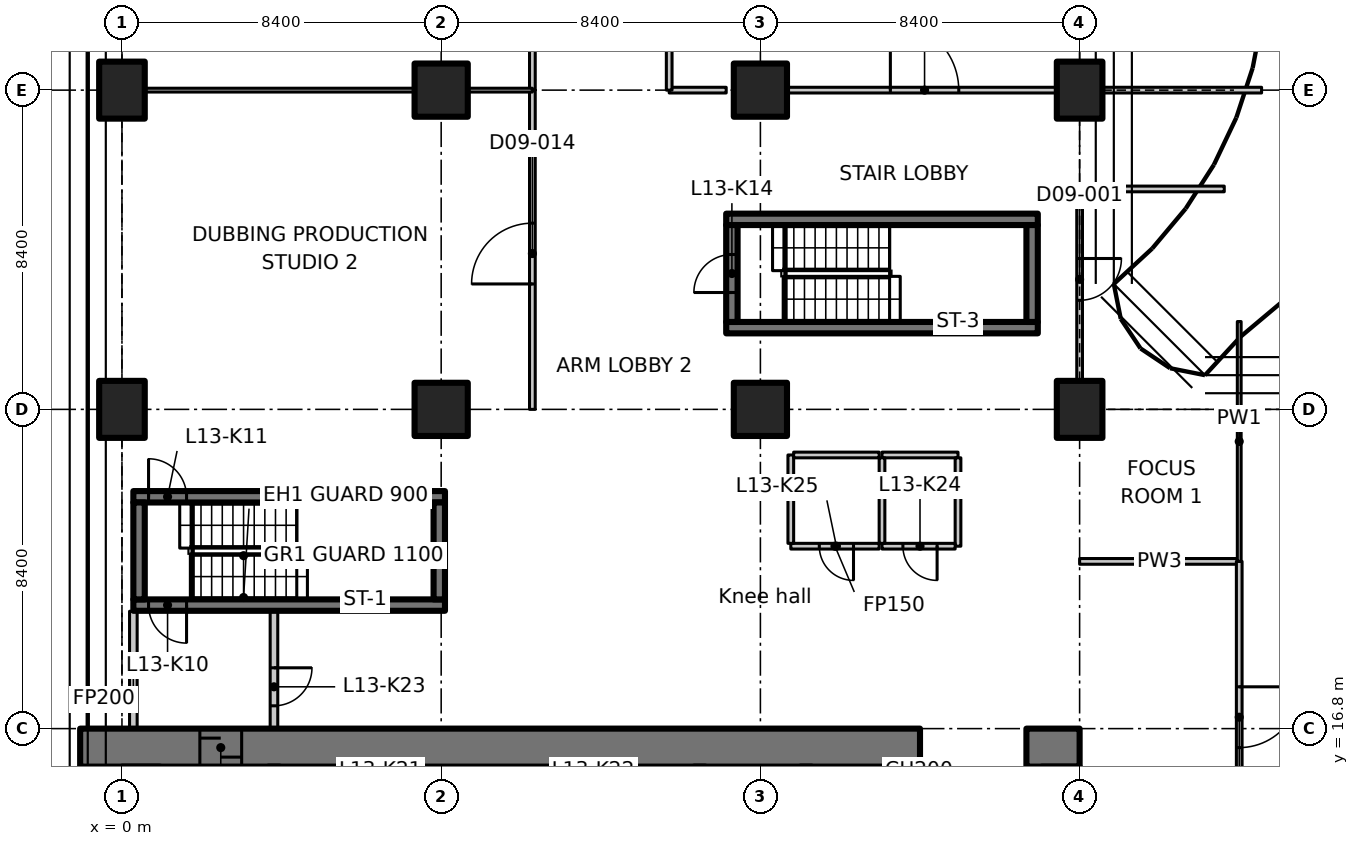
"""IFC4 building model, lengths in metres.
Left out: names, types, materials, properties, quantities, classifications, styles, units other than length and angle.
Written with IfcOpenShell. Run it as: python <this file> out.ifc"""

import sys

from ifc_helpers import new_model, si_unit, direction, frame, frame_2d, origin, origin_2d, place, context, subcontext, project, spatial, polyline, rectangle, outline, extrude, element, fill, save


model = new_model("IFC4")
c1 = context("Model", 3, precision=1e-05, world=origin(), true_north=direction((0.0, 1.0)))
c2 = subcontext(c1, "Body", "Model", "MODEL_VIEW")
j1 = project(units=[si_unit("LENGTHUNIT", "METRE"), si_unit("PLANEANGLEUNIT", "RADIAN")], contexts=[c1])
p1 = place(None, origin())
s1 = spatial("IfcSite", under=j1, at=p1, CompositionType="ELEMENT")
p2 = place(p1, origin())
s2 = spatial("IfcBuilding", under=s1, at=p2, CompositionType="ELEMENT")
p3 = place(p2, frame((0.0, 0.0, 61.7)))
s3 = spatial("IfcBuildingStorey", under=s2, at=p3, CompositionType="ELEMENT", Elevation=61.7)
for number, where, z_axis, x_axis in (
    (1, (0.0, 25.2, 0.0), (0.0, 0.0, 1.0), (1.0, 0.0, 0.0)),
    (2, (0.0, 33.6, 0.0), (0.0, 0.0, 1.0), (1.0, 0.0, 0.0)),
):
    element("IfcColumn", number, at=place(p3, frame(where, z_axis=z_axis, x_axis=x_axis)), inside=s3, PredefinedType="COLUMN", context=c2, shape_type="SweptSolid", body=[
        extrude(rectangle(XDim=1.2, YDim=1.5, at=origin_2d()), origin(), (0.0, 0.0, 1.0), 3.35),
    ])
for number, where, z_axis, x_axis in (
    (3, (8.4, 25.2, 0.0), (0.0, 0.0, 1.0), (1.0, 0.0, 0.0)),
    (4, (8.4, 33.6, 0.0), (0.0, 0.0, 1.0), (1.0, 0.0, 0.0)),
    (5, (16.8, 25.2, 0.0), (0.0, 0.0, 1.0), (1.0, 0.0, 0.0)),
    (6, (16.8, 33.6, 0.0), (0.0, 0.0, 1.0), (1.0, 0.0, 0.0)),
):
    element("IfcColumn", number, at=place(p3, frame(where, z_axis=z_axis, x_axis=x_axis)), inside=s3, PredefinedType="COLUMN", context=c2, shape_type="SweptSolid", body=[
        extrude(rectangle(XDim=1.4, YDim=1.4, at=origin_2d()), origin(), (0.0, 0.0, 1.0), 3.35),
    ])
for number, where, z_axis, x_axis in (
    (7, (25.2, 25.2, 0.0), (0.0, 0.0, 1.0), (1.0, 0.0, 0.0)),
    (8, (25.2, 33.6, 0.0), (0.0, 0.0, 1.0), (1.0, 0.0, 0.0)),
):
    element("IfcColumn", number, at=place(p3, frame(where, z_axis=z_axis, x_axis=x_axis)), inside=s3, PredefinedType="COLUMN", context=c2, shape_type="SweptSolid", body=[
        extrude(rectangle(XDim=1.2, YDim=1.5, at=origin_2d()), origin(), (0.0, 0.0, 1.0), 3.35),
    ])
p4 = place(p3, frame((-1.1, 16.3, 0.0), z_axis=(0.0, 0.0, 1.0), x_axis=(1.0, 0.0, 0.0)))
e9 = element("IfcWall", 9, at=p4, inside=s3, PredefinedType="SHEAR", context=c2, shape_type="SweptSolid", body=[
    extrude(rectangle(XDim=22.1, YDim=1.0, at=frame_2d((11.05, 0.0))), origin(), (0.0, 0.0, 1.0), 3.35),
])
p5 = place(p4, frame((3.15, 0.0, 0.0)))
e10 = element("IfcOpeningElement", 10, at=p5, cuts=e9, PredefinedType="OPENING", context=c2, shape_type="SweptSolid", body=[
    extrude(rectangle(XDim=1.1, YDim=2.3, at=frame_2d((0.55, 1.15))), frame((0.0, 0.51, 0.0), z_axis=(0.0, -1.0, 0.0), x_axis=(1.0, 0.0, 0.0)), (0.0, 0.0, 1.0), 1.02),
])
p6 = place(p3, frame((23.8, 16.3, 0.0), z_axis=(0.0, 0.0, 1.0), x_axis=(1.0, 0.0, 0.0)))
e11 = element("IfcWall", 11, at=p6, inside=s3, PredefinedType="SHEAR", context=c2, shape_type="SweptSolid", body=[
    extrude(rectangle(XDim=1.4, YDim=1.0, at=frame_2d((0.7, 0.0))), origin(), (0.0, 0.0, 1.0), 3.35),
])
p7 = place(p3, frame((24.7, 12.6, 0.0), z_axis=(0.0, 0.0, 1.0), x_axis=(0.0, 1.0, 0.0)))
e12 = element("IfcWall", 12, at=p7, inside=s3, PredefinedType="SHEAR", context=c2, shape_type="SweptSolid", body=[
    extrude(rectangle(XDim=3.2, YDim=1.0, at=frame_2d((1.6, 0.0))), origin(), (0.0, 0.0, 1.0), 3.35),
])
p8 = place(p3, frame((8.5, 20.05, 0.0), z_axis=(0.0, 0.0, 1.0), x_axis=(-1.0, 0.0, 0.0)))
e13 = element("IfcWall", 13, at=p8, inside=s3, PredefinedType="SHEAR", context=c2, shape_type="SweptSolid", body=[
    extrude(rectangle(XDim=8.2, YDim=0.3, at=frame_2d((4.1, 0.0))), origin(), (0.0, 0.0, 1.0), 3.35),
])
p9 = place(p8, frame((6.8, 0.0, 0.0)))
e14 = element("IfcOpeningElement", 14, at=p9, cuts=e13, PredefinedType="OPENING", context=c2, shape_type="SweptSolid", body=[
    extrude(rectangle(XDim=1.0, YDim=2.1, at=frame_2d((0.5, 1.05))), frame((0.0, 0.16, 0.0), z_axis=(0.0, -1.0, 0.0), x_axis=(1.0, 0.0, 0.0)), (0.0, 0.0, 1.0), 0.32),
])
p10 = place(p3, frame((0.3, 22.9, 0.0), z_axis=(0.0, 0.0, 1.0), x_axis=(1.0, 0.0, 0.0)))
e15 = element("IfcWall", 15, at=p10, inside=s3, PredefinedType="SHEAR", context=c2, shape_type="SweptSolid", body=[
    extrude(rectangle(XDim=8.2, YDim=0.3, at=frame_2d((4.1, 0.0))), origin(), (0.0, 0.0, 1.0), 3.35),
])
p11 = place(p10, frame((0.4, 0.0, 0.0)))
e16 = element("IfcOpeningElement", 16, at=p11, cuts=e15, PredefinedType="OPENING", context=c2, shape_type="SweptSolid", body=[
    extrude(rectangle(XDim=1.0, YDim=2.1, at=frame_2d((0.5, 1.05))), frame((0.0, 0.16, 0.0), z_axis=(0.0, -1.0, 0.0), x_axis=(1.0, 0.0, 0.0)), (0.0, 0.0, 1.0), 0.32),
])
for number, where, z_axis, x_axis in (
    (17, (0.45, 20.2, 0.0), (0.0, 0.0, 1.0), (0.0, 1.0, 0.0)),
    (18, (8.35, 20.2, 0.0), (0.0, 0.0, 1.0), (0.0, 1.0, 0.0)),
):
    element("IfcWall", number, at=place(p3, frame(where, z_axis=z_axis, x_axis=x_axis)), inside=s3, PredefinedType="SHEAR", context=c2, shape_type="SweptSolid", body=[
        extrude(rectangle(XDim=2.55, YDim=0.3, at=frame_2d((1.275, 0.0))), origin(), (0.0, 0.0, 1.0), 3.35),
    ])
for number, where, z_axis, x_axis in (
    (19, (15.9, 27.35, 0.0), (0.0, 0.0, 1.0), (1.0, 0.0, 0.0)),
    (20, (15.9, 30.2, 0.0), (0.0, 0.0, 1.0), (1.0, 0.0, 0.0)),
):
    element("IfcWall", number, at=place(p3, frame(where, z_axis=z_axis, x_axis=x_axis)), inside=s3, PredefinedType="SHEAR", context=c2, shape_type="SweptSolid", body=[
        extrude(rectangle(XDim=8.2, YDim=0.3, at=frame_2d((4.1, 0.0))), origin(), (0.0, 0.0, 1.0), 3.35),
    ])
p12 = place(p3, frame((16.05, 27.5, 0.0), z_axis=(0.0, 0.0, 1.0), x_axis=(0.0, 1.0, 0.0)))
e21 = element("IfcWall", 21, at=p12, inside=s3, PredefinedType="SHEAR", context=c2, shape_type="SweptSolid", body=[
    extrude(rectangle(XDim=2.55, YDim=0.3, at=frame_2d((1.275, 0.0))), origin(), (0.0, 0.0, 1.0), 3.35),
])
p13 = place(p12, frame((0.775, 0.0, 0.0)))
e22 = element("IfcOpeningElement", 22, at=p13, cuts=e21, PredefinedType="OPENING", context=c2, shape_type="SweptSolid", body=[
    extrude(rectangle(XDim=1.0, YDim=2.1, at=frame_2d((0.5, 1.05))), frame((0.0, 0.16, 0.0), z_axis=(0.0, -1.0, 0.0), x_axis=(1.0, 0.0, 0.0)), (0.0, 0.0, 1.0), 0.32),
])
p14 = place(p3, frame((23.95, 27.5, 0.0), z_axis=(0.0, 0.0, 1.0), x_axis=(0.0, 1.0, 0.0)))
e23 = element("IfcWall", 23, at=p14, inside=s3, PredefinedType="SHEAR", context=c2, shape_type="SweptSolid", body=[
    extrude(rectangle(XDim=2.55, YDim=0.3, at=frame_2d((1.275, 0.0))), origin(), (0.0, 0.0, 1.0), 3.35),
])
p15 = place(p3, frame((0.3, 16.812, 0.0), z_axis=(0.0, 0.0, 1.0), x_axis=(0.0, 1.0, 0.0)))
e24 = element("IfcWall", 24, at=p15, inside=s3, PredefinedType="PARTITIONING", context=c2, shape_type="SweptSolid", body=[
    extrude(rectangle(XDim=3.076, YDim=0.2, at=frame_2d((1.538, 0.0))), origin(), (0.0, 0.0, 1.0), 2.98),
])
p16 = place(p3, frame((4.0, 19.888, 0.0), z_axis=(0.0, 0.0, 1.0), x_axis=(0.0, -1.0, 0.0)))
e25 = element("IfcWall", 25, at=p16, inside=s3, PredefinedType="PARTITIONING", context=c2, shape_type="SweptSolid", body=[
    extrude(rectangle(XDim=3.076, YDim=0.2, at=frame_2d((1.538, 0.0))), origin(), (0.0, 0.0, 1.0), 3.35),
])
p17 = place(p16, frame((1.488, 0.0, 0.0)))
e26 = element("IfcOpeningElement", 26, at=p17, cuts=e25, PredefinedType="OPENING", context=c2, shape_type="SweptSolid", body=[
    extrude(rectangle(XDim=1.0, YDim=2.1, at=frame_2d((0.5, 1.05))), frame((0.0, 0.11, 0.0), z_axis=(0.0, -1.0, 0.0), x_axis=(1.0, 0.0, 0.0)), (0.0, 0.0, 1.0), 0.22),
])
p18 = place(p3, frame((20.0, 24.0, 0.0), z_axis=(0.0, 0.0, 1.0), x_axis=(1.0, 0.0, 0.0)))
e27 = element("IfcWall", 27, at=p18, inside=s3, PredefinedType="PARTITIONING", context=c2, shape_type="SweptSolid", body=[
    extrude(rectangle(XDim=2.0, YDim=0.15, at=frame_2d((1.0, 0.0))), origin(), (0.0, 0.0, 1.0), 3.35),
])
p19 = place(p3, frame((22.0, 23.925, 0.0), z_axis=(0.0, 0.0, 1.0), x_axis=(0.0, -1.0, 0.0)))
e28 = element("IfcWall", 28, at=p19, inside=s3, PredefinedType="PARTITIONING", context=c2, shape_type="SweptSolid", body=[
    extrude(rectangle(XDim=2.325, YDim=0.15, at=frame_2d((1.163, 0.0))), origin(), (0.0, 0.0, 1.0), 3.35),
])
p20 = place(p3, frame((21.925, 21.6, 0.0), z_axis=(0.0, 0.0, 1.0), x_axis=(-1.0, 0.0, 0.0)))
e29 = element("IfcWall", 29, at=p20, inside=s3, PredefinedType="PARTITIONING", context=c2, shape_type="SweptSolid", body=[
    extrude(rectangle(XDim=1.925, YDim=0.15, at=frame_2d((0.962, 0.0))), origin(), (0.0, 0.0, 1.0), 3.35),
])
p21 = place(p20, frame((0.475, 0.0, 0.0)))
e30 = element("IfcOpeningElement", 30, at=p21, cuts=e29, PredefinedType="OPENING", context=c2, shape_type="SweptSolid", body=[
    extrude(rectangle(XDim=0.9, YDim=2.1, at=frame_2d((0.45, 1.05))), frame((0.0, 0.085, 0.0), z_axis=(0.0, -1.0, 0.0), x_axis=(1.0, 0.0, 0.0)), (0.0, 0.0, 1.0), 0.17),
])
p22 = place(p3, frame((20.0, 21.675, 0.0), z_axis=(0.0, 0.0, 1.0), x_axis=(0.0, 1.0, 0.0)))
e31 = element("IfcWall", 31, at=p22, inside=s3, PredefinedType="PARTITIONING", context=c2, shape_type="SweptSolid", body=[
    extrude(rectangle(XDim=2.25, YDim=0.15, at=frame_2d((1.125, 0.0))), origin(), (0.0, 0.0, 1.0), 3.35),
])
p23 = place(p3, frame((19.925, 21.6, 0.0), z_axis=(0.0, 0.0, 1.0), x_axis=(-1.0, 0.0, 0.0)))
e32 = element("IfcWall", 32, at=p23, inside=s3, PredefinedType="PARTITIONING", context=c2, shape_type="SweptSolid", body=[
    extrude(rectangle(XDim=2.325, YDim=0.15, at=frame_2d((1.163, 0.0))), origin(), (0.0, 0.0, 1.0), 3.35),
])
p24 = place(p23, frame((0.675, 0.0, 0.0)))
e33 = element("IfcOpeningElement", 33, at=p24, cuts=e32, PredefinedType="OPENING", context=c2, shape_type="SweptSolid", body=[
    extrude(rectangle(XDim=0.9, YDim=2.1, at=frame_2d((0.45, 1.05))), frame((0.0, 0.085, 0.0), z_axis=(0.0, -1.0, 0.0), x_axis=(1.0, 0.0, 0.0)), (0.0, 0.0, 1.0), 0.17),
])
p25 = place(p3, frame((17.6, 21.675, 0.0), z_axis=(0.0, 0.0, 1.0), x_axis=(0.0, 1.0, 0.0)))
e34 = element("IfcWall", 34, at=p25, inside=s3, PredefinedType="PARTITIONING", context=c2, shape_type="SweptSolid", body=[
    extrude(rectangle(XDim=2.325, YDim=0.15, at=frame_2d((1.163, 0.0))), origin(), (0.0, 0.0, 1.0), 3.35),
])
p26 = place(p3, frame((17.675, 24.0, 0.0), z_axis=(0.0, 0.0, 1.0), x_axis=(1.0, 0.0, 0.0)))
e35 = element("IfcWall", 35, at=p26, inside=s3, PredefinedType="PARTITIONING", context=c2, shape_type="SweptSolid", body=[
    extrude(rectangle(XDim=2.25, YDim=0.15, at=frame_2d((1.125, 0.0))), origin(), (0.0, 0.0, 1.0), 3.35),
])
p27 = place(p3, frame((25.2, 21.2, 0.0), z_axis=(0.0, 0.0, 1.0), x_axis=(1.0, 0.0, 0.0)))
e36 = element("IfcWall", 36, at=p27, inside=s3, PredefinedType="PARTITIONING", context=c2, shape_type="SweptSolid", body=[
    extrude(rectangle(XDim=4.2, YDim=0.15, at=frame_2d((2.1, 0.0))), origin(), (0.0, 0.0, 1.0), 3.33),
])
p28 = place(p3, frame((29.4, 21.2, 0.0), z_axis=(0.0, 0.0, 1.0), x_axis=(0.0, -1.0, 0.0)))
e37 = element("IfcWall", 37, at=p28, inside=s3, PredefinedType="PARTITIONING", context=c2, shape_type="SweptSolid", body=[
    extrude(rectangle(XDim=8.2, YDim=0.15, at=frame_2d((4.1, 0.0))), origin(), (0.0, 0.0, 1.0), 3.33),
])
p29 = place(p28, frame((3.3, 0.0, 0.0)))
e38 = element("IfcOpeningElement", 38, at=p29, cuts=e37, PredefinedType="OPENING", context=c2, shape_type="SweptSolid", body=[
    extrude(rectangle(XDim=1.6, YDim=2.1, at=frame_2d((0.8, 1.05))), frame((0.0, 0.085, 0.0), z_axis=(0.0, -1.0, 0.0), x_axis=(1.0, 0.0, 0.0)), (0.0, 0.0, 1.0), 0.17),
])
p30 = place(p3, frame((29.4, 27.511, 0.0), z_axis=(0.0, 0.0, 1.0), x_axis=(0.0, -1.0, 0.0)))
e39 = element("IfcWall", 39, at=p30, inside=s3, PredefinedType="PARTITIONING", context=c2, shape_type="SweptSolid", body=[
    extrude(outline(polyline([(0.0, 0.0), (6.311, 0.0), (6.311, 3.33), (2.761, 3.33), (2.759, 2.98), (1.863, 2.98), (1.861, 3.33), (0.236, 3.33), (0.0, 3.33), (0.0, 0.0)])), frame((0.0, 0.05, 0.0), z_axis=(0.0, -1.0, 0.0), x_axis=(1.0, 0.0, 0.0)), (0.0, 0.0, 1.0), 0.1),
])
p31 = place(p3, frame((25.2, 31.0, 0.0), z_axis=(0.0, 0.0, 1.0), x_axis=(0.0, -1.0, 0.0)))
e40 = element("IfcWall", 40, at=p31, inside=s3, PredefinedType="PARTITIONING", context=c2, shape_type="SweptSolid", body=[
    extrude(outline(polyline([(0.0, 0.0), (5.03, 0.0), (5.03, 2.98), (0.0, 2.98), (0.0, 0.0)])), frame((0.0, 0.075, 0.0), z_axis=(0.0, -1.0, 0.0), x_axis=(1.0, 0.0, 0.0)), (0.0, 0.0, 1.0), 0.15),
])
p32 = place(p31, frame((1.83, 0.0, 0.0)))
e41 = element("IfcOpeningElement", 41, at=p32, cuts=e40, PredefinedType="OPENING", context=c2, shape_type="SweptSolid", body=[
    extrude(rectangle(XDim=1.1, YDim=2.1, at=frame_2d((0.55, 1.05))), frame((0.0, 0.085, 0.0), z_axis=(0.0, -1.0, 0.0), x_axis=(1.0, 0.0, 0.0)), (0.0, 0.0, 1.0), 0.17),
])
p33 = place(p3, frame((25.2, 31.0, 0.0), z_axis=(0.0, 0.0, 1.0), x_axis=(1.0, 0.0, 0.0)))
e42 = element("IfcWall", 42, at=p33, inside=s3, PredefinedType="PARTITIONING", context=c2, shape_type="SweptSolid", body=[
    extrude(rectangle(XDim=3.806, YDim=0.15, at=frame_2d((1.903, 0.0))), origin(), (0.0, 0.0, 1.0), 2.98),
])
p34 = place(p3, frame((10.8, 25.2, 0.0), z_axis=(0.0, 0.0, 1.0), x_axis=(0.0, 1.0, 0.0)))
e43 = element("IfcWall", 43, at=p34, inside=s3, PredefinedType="PARTITIONING", context=c2, shape_type="SweptSolid", body=[
    extrude(rectangle(XDim=8.4, YDim=0.15, at=frame_2d((4.2, 0.0))), origin(), (0.0, 0.0, 1.0), 3.33),
])
p35 = place(p34, frame((3.3, 0.0, 0.0)))
e44 = element("IfcOpeningElement", 44, at=p35, cuts=e43, PredefinedType="OPENING", context=c2, shape_type="SweptSolid", body=[
    extrude(rectangle(XDim=1.6, YDim=2.1, at=frame_2d((0.8, 1.05))), frame((0.0, 0.085, 0.0), z_axis=(0.0, -1.0, 0.0), x_axis=(1.0, 0.0, 0.0)), (0.0, 0.0, 1.0), 0.17),
])
p36 = place(p3, frame((14.4, 33.6, 0.0), z_axis=(0.0, 0.0, 1.0), x_axis=(1.0, 0.0, 0.0)))
e45 = element("IfcWall", 45, at=p36, inside=s3, PredefinedType="PARTITIONING", context=c2, shape_type="SweptSolid", body=[
    extrude(rectangle(XDim=1.5, YDim=0.15, at=frame_2d((0.75, 0.0))), origin(), (0.0, 0.0, 1.0), 3.33),
])
p37 = place(p3, frame((17.52, 33.6, 0.0), z_axis=(0.0, 0.0, 1.0), x_axis=(1.0, 0.0, 0.0)))
e46 = element("IfcWall", 46, at=p37, inside=s3, PredefinedType="PARTITIONING", context=c2, shape_type="SweptSolid", body=[
    extrude(rectangle(XDim=7.06, YDim=0.15, at=frame_2d((3.53, 0.0))), origin(), (0.0, 0.0, 1.0), 3.33),
])
p38 = place(p37, frame((2.7, 0.0, 0.0)))
e47 = element("IfcOpeningElement", 47, at=p38, cuts=e46, PredefinedType="OPENING", context=c2, shape_type="SweptSolid", body=[
    extrude(rectangle(XDim=1.8, YDim=2.1, at=frame_2d((0.9, 1.05))), frame((0.0, 0.085, 0.0), z_axis=(0.0, -1.0, 0.0), x_axis=(1.0, 0.0, 0.0)), (0.0, 0.0, 1.0), 0.17),
])
p39 = place(p3, frame((25.82, 33.6, 0.0), z_axis=(0.0, 0.0, 1.0), x_axis=(1.0, 0.0, 0.0)))
e48 = element("IfcWall", 48, at=p39, inside=s3, PredefinedType="PARTITIONING", context=c2, shape_type="SweptSolid", body=[
    extrude(rectangle(XDim=4.168, YDim=0.15, at=frame_2d((2.084, 0.0))), origin(), (0.0, 0.0, 1.0), 2.98),
])
p40 = place(p3, frame((10.8, 33.6, 0.0), z_axis=(0.0, 0.0, 1.0), x_axis=(0.0, 1.0, 0.0)))
e49 = element("IfcWall", 49, at=p40, inside=s3, PredefinedType="PARTITIONING", context=c2, shape_type="SweptSolid", body=[
    extrude(rectangle(XDim=8.4, YDim=0.15, at=frame_2d((4.2, 0.0))), origin(), (0.0, 0.0, 1.0), 3.33),
])
p41 = place(p40, frame((3.3, 0.0, 0.0)))
e50 = element("IfcOpeningElement", 50, at=p41, cuts=e49, PredefinedType="OPENING", context=c2, shape_type="SweptSolid", body=[
    extrude(rectangle(XDim=1.6, YDim=2.1, at=frame_2d((0.8, 1.05))), frame((0.0, 0.085, 0.0), z_axis=(0.0, -1.0, 0.0), x_axis=(1.0, 0.0, 0.0)), (0.0, 0.0, 1.0), 0.17),
])
p42 = place(p3, frame((14.4, 42.0, 0.0), z_axis=(0.0, 0.0, 1.0), x_axis=(0.0, -1.0, 0.0)))
e51 = element("IfcWall", 51, at=p42, inside=s3, PredefinedType="PARTITIONING", context=c2, shape_type="SweptSolid", body=[
    extrude(rectangle(XDim=8.4, YDim=0.15, at=frame_2d((4.2, 0.0))), origin(), (0.0, 0.0, 1.0), 3.33),
])
p43 = place(p3, frame((0.62, 33.6, 0.0), z_axis=(0.0, 0.0, 1.0), x_axis=(1.0, 0.0, 0.0)))
e52 = element("IfcWall", 52, at=p43, inside=s3, PredefinedType="PARTITIONING", context=c2, shape_type="SweptSolid", body=[
    extrude(rectangle(XDim=7.06, YDim=0.1, at=frame_2d((3.53, 0.0))), origin(), (0.0, 0.0, 1.0), 3.33),
])
p44 = place(p3, frame((9.12, 33.6, 0.0), z_axis=(0.0, 0.0, 1.0), x_axis=(1.0, 0.0, 0.0)))
e53 = element("IfcWall", 53, at=p44, inside=s3, PredefinedType="PARTITIONING", context=c2, shape_type="SweptSolid", body=[
    extrude(rectangle(XDim=1.68, YDim=0.1, at=frame_2d((0.84, 0.0))), origin(), (0.0, 0.0, 1.0), 3.33),
])
p45 = place(p5, origin())
e54 = element("IfcDoor", 54, at=p45, inside=s3, OperationType="SLIDING_TO_LEFT", PredefinedType="DOOR", context=c2, shape_type="SweptSolid", body=[
    extrude(rectangle(XDim=1.1, YDim=2.3, at=frame_2d((0.55, 1.15))), frame((0.0, 0.025, 0.0), z_axis=(0.0, -1.0, 0.0), x_axis=(1.0, 0.0, 0.0)), (0.0, 0.0, 1.0), 0.05),
])
fill(e10, e54)
p46 = place(p9, origin())
e55 = element("IfcDoor", 55, at=p46, inside=s3, OperationType="SINGLE_SWING_LEFT", PredefinedType="DOOR", context=c2, shape_type="SweptSolid", body=[
    extrude(rectangle(XDim=1.0, YDim=2.1, at=frame_2d((0.5, 1.05))), frame((0.0, 0.025, 0.0), z_axis=(0.0, -1.0, 0.0), x_axis=(1.0, 0.0, 0.0)), (0.0, 0.0, 1.0), 0.05),
])
fill(e14, e55)
p47 = place(p11, origin())
e56 = element("IfcDoor", 56, at=p47, inside=s3, OperationType="SINGLE_SWING_RIGHT", PredefinedType="DOOR", context=c2, shape_type="SweptSolid", body=[
    extrude(rectangle(XDim=1.0, YDim=2.1, at=frame_2d((0.5, 1.05))), frame((0.0, 0.025, 0.0), z_axis=(0.0, -1.0, 0.0), x_axis=(1.0, 0.0, 0.0)), (0.0, 0.0, 1.0), 0.05),
])
fill(e16, e56)
p48 = place(p13, origin())
e57 = element("IfcDoor", 57, at=p48, inside=s3, OperationType="SINGLE_SWING_LEFT", PredefinedType="DOOR", context=c2, shape_type="SweptSolid", body=[
    extrude(rectangle(XDim=1.0, YDim=2.1, at=frame_2d((0.5, 1.05))), frame((0.0, 0.025, 0.0), z_axis=(0.0, -1.0, 0.0), x_axis=(1.0, 0.0, 0.0)), (0.0, 0.0, 1.0), 0.05),
])
fill(e22, e57)
p49 = place(p17, origin())
e58 = element("IfcDoor", 58, at=p49, inside=s3, OperationType="SINGLE_SWING_RIGHT", PredefinedType="DOOR", context=c2, shape_type="SweptSolid", body=[
    extrude(rectangle(XDim=1.0, YDim=2.1, at=frame_2d((0.5, 1.05))), frame((0.0, 0.025, 0.0), z_axis=(0.0, -1.0, 0.0), x_axis=(1.0, 0.0, 0.0)), (0.0, 0.0, 1.0), 0.05),
])
fill(e26, e58)
p50 = place(p21, origin())
e59 = element("IfcDoor", 59, at=p50, inside=s3, OperationType="SINGLE_SWING_LEFT", PredefinedType="DOOR", context=c2, shape_type="SweptSolid", body=[
    extrude(rectangle(XDim=0.9, YDim=2.1, at=frame_2d((0.45, 1.05))), frame((0.0, 0.025, 0.0), z_axis=(0.0, -1.0, 0.0), x_axis=(1.0, 0.0, 0.0)), (0.0, 0.0, 1.0), 0.05),
])
fill(e30, e59)
p51 = place(p24, origin())
e60 = element("IfcDoor", 60, at=p51, inside=s3, OperationType="SINGLE_SWING_RIGHT", PredefinedType="DOOR", context=c2, shape_type="SweptSolid", body=[
    extrude(rectangle(XDim=0.9, YDim=2.1, at=frame_2d((0.45, 1.05))), frame((0.0, 0.025, 0.0), z_axis=(0.0, -1.0, 0.0), x_axis=(1.0, 0.0, 0.0)), (0.0, 0.0, 1.0), 0.05),
])
fill(e33, e60)
p52 = place(p32, origin())
e61 = element("IfcDoor", 61, at=p52, inside=s3, OperationType="SINGLE_SWING_RIGHT", PredefinedType="DOOR", context=c2, shape_type="SweptSolid", body=[
    extrude(rectangle(XDim=1.1, YDim=2.1, at=frame_2d((0.55, 1.05))), frame((0.0, 0.025, 0.0), z_axis=(0.0, -1.0, 0.0), x_axis=(1.0, 0.0, 0.0)), (0.0, 0.0, 1.0), 0.05),
])
fill(e41, e61)
p53 = place(p29, origin())
e62 = element("IfcDoor", 62, at=p53, inside=s3, OperationType="DOUBLE_DOOR_SINGLE_SWING", PredefinedType="DOOR", context=c2, shape_type="SweptSolid", body=[
    extrude(rectangle(XDim=1.6, YDim=2.1, at=frame_2d((0.8, 1.05))), frame((0.0, 0.025, 0.0), z_axis=(0.0, -1.0, 0.0), x_axis=(1.0, 0.0, 0.0)), (0.0, 0.0, 1.0), 0.05),
])
fill(e38, e62)
p54 = place(p35, origin())
e63 = element("IfcDoor", 63, at=p54, inside=s3, OperationType="DOUBLE_DOOR_SINGLE_SWING", PredefinedType="DOOR", context=c2, shape_type="SweptSolid", body=[
    extrude(rectangle(XDim=1.6, YDim=2.1, at=frame_2d((0.8, 1.05))), frame((0.0, 0.025, 0.0), z_axis=(0.0, -1.0, 0.0), x_axis=(1.0, 0.0, 0.0)), (0.0, 0.0, 1.0), 0.05),
])
fill(e44, e63)
p55 = place(p38, origin())
e64 = element("IfcDoor", 64, at=p55, inside=s3, OperationType="DOUBLE_DOOR_SINGLE_SWING", PredefinedType="DOOR", context=c2, shape_type="SweptSolid", body=[
    extrude(rectangle(XDim=1.8, YDim=2.1, at=frame_2d((0.9, 1.05))), frame((0.0, 0.025, 0.0), z_axis=(0.0, -1.0, 0.0), x_axis=(1.0, 0.0, 0.0)), (0.0, 0.0, 1.0), 0.05),
])
fill(e47, e64)
save(model, sys.argv[1])
